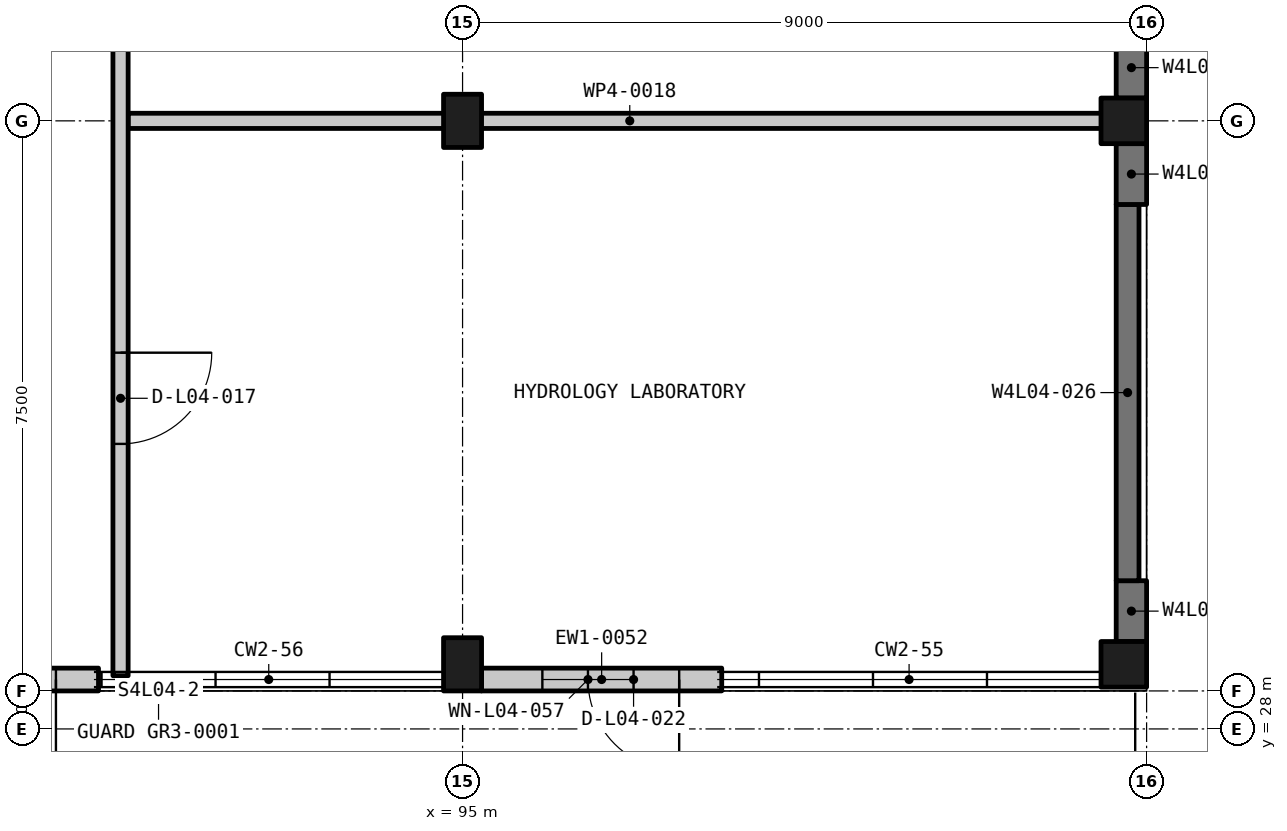
"""IFC4 building model, lengths in metres.
Left out: names, types, materials, properties, quantities, classifications, styles, units other than length and angle.
Written with IfcOpenShell. Run it as: python <this file> out.ifc"""

import sys

from ifc_helpers import new_model, si_unit, direction, frame, frame_2d, origin, origin_2d, place, context, subcontext, project, spatial, rectangle, extrude, element, fill, save


model = new_model("IFC4")
c1 = context("Model", 3, precision=1e-05, world=origin(), true_north=direction((0.0, 1.0)))
c2 = subcontext(c1, "Body", "Model", "MODEL_VIEW")
j1 = project(units=[si_unit("LENGTHUNIT", "METRE"), si_unit("PLANEANGLEUNIT", "RADIAN")], contexts=[c1])
p1 = place(None, origin())
s1 = spatial("IfcSite", under=j1, at=p1, CompositionType="ELEMENT")
p2 = place(p1, origin())
s2 = spatial("IfcBuilding", under=s1, at=p2, CompositionType="ELEMENT")
p3 = place(p2, frame((0.0, 0.0, 20.25)))
s3 = spatial("IfcBuildingStorey", under=s2, at=p3, CompositionType="ELEMENT", Elevation=20.25)
for number, where, z_axis, x_axis in (
    (1, (95.0, 28.85, -0.3), (0.0, 0.0, 1.0), (1.0, 0.0, 0.0)),
    (2, (95.0, 36.0, -0.3), (0.0, 0.0, 1.0), (1.0, 0.0, 0.0)),
):
    element("IfcColumn", number, at=place(p3, frame(where, z_axis=z_axis, x_axis=x_axis)), inside=s3, PredefinedType="COLUMN", context=c2, shape_type="SweptSolid", body=[
        extrude(rectangle(XDim=0.5, YDim=0.7, at=origin_2d()), origin(), (0.0, 0.0, 1.0), 4.5),
    ])
for number, where, z_axis, x_axis in (
    (3, (103.7, 28.85, -0.3), (0.0, 0.0, 1.0), (1.0, 0.0, 0.0)),
    (4, (103.7, 36.0, -0.3), (0.0, 0.0, 1.0), (1.0, 0.0, 0.0)),
):
    element("IfcColumn", number, at=place(p3, frame(where, z_axis=z_axis, x_axis=x_axis)), inside=s3, PredefinedType="COLUMN", context=c2, shape_type="SweptSolid", body=[
        extrude(rectangle(XDim=0.6, YDim=0.6, at=origin_2d()), origin(), (0.0, 0.0, 1.0), 4.5),
    ])
p4 = place(p3, frame((103.8, 29.15, -0.3), z_axis=(0.0, 0.0, 1.0), x_axis=(0.0, 1.0, 0.0)))
e5 = element("IfcWall", 5, at=p4, inside=s3, PredefinedType="SOLIDWALL", context=c2, shape_type="SweptSolid", body=[
    extrude(rectangle(XDim=0.8, YDim=0.4, at=frame_2d((0.4, 0.0))), origin(), (0.0, 0.0, 1.0), 4.5),
])
p5 = place(p3, frame((103.75, 29.95, -0.3), z_axis=(0.0, 0.0, 1.0), x_axis=(0.0, 1.0, 0.0)))
e6 = element("IfcWall", 6, at=p5, inside=s3, PredefinedType="SOLIDWALL", context=c2, shape_type="SweptSolid", body=[
    extrude(rectangle(XDim=4.95, YDim=0.3, at=frame_2d((2.475, 0.0))), origin(), (0.0, 0.0, 1.0), 4.5),
])
for number, where, z_axis, x_axis in (
    (7, (103.8, 34.9, -0.3), (0.0, 0.0, 1.0), (0.0, 1.0, 0.0)),
    (8, (103.8, 36.3, -0.3), (0.0, 0.0, 1.0), (0.0, 1.0, 0.0)),
):
    element("IfcWall", number, at=place(p3, frame(where, z_axis=z_axis, x_axis=x_axis)), inside=s3, PredefinedType="SOLIDWALL", context=c2, shape_type="SweptSolid", body=[
        extrude(rectangle(XDim=0.8, YDim=0.4, at=frame_2d((0.4, 0.0))), origin(), (0.0, 0.0, 1.0), 4.5),
    ])
p6 = place(p3, frame((98.41, 28.65, 0.0), z_axis=(0.0, 0.0, 1.0), x_axis=(-1.0, 0.0, 0.0)))
e9 = element("IfcWall", 9, at=p6, inside=s3, PredefinedType="SOLIDWALL", context=c2, shape_type="SweptSolid", body=[
    extrude(rectangle(XDim=3.16, YDim=0.3, at=frame_2d((1.58, 0.0))), origin(), (0.0, 0.0, 1.0), 3.4),
])
p7 = place(p6, frame((0.56, 0.0, 0.0)))
e10 = element("IfcOpeningElement", 10, at=p7, cuts=e9, PredefinedType="OPENING", context=c2, shape_type="SweptSolid", body=[
    extrude(rectangle(XDim=1.2, YDim=2.2, at=frame_2d((0.6, 1.1))), frame((0.0, 0.16, 0.0), z_axis=(0.0, -1.0, 0.0), x_axis=(1.0, 0.0, 0.0)), (0.0, 0.0, 1.0), 0.32),
])
p8 = place(p6, frame((1.16, 0.0, 2.4)))
e11 = element("IfcOpeningElement", 11, at=p8, cuts=e9, PredefinedType="OPENING", context=c2, shape_type="SweptSolid", body=[
    extrude(rectangle(XDim=1.2, YDim=0.6, at=frame_2d((0.6, 0.3))), frame((0.0, 0.16, 0.0), z_axis=(0.0, -1.0, 0.0), x_axis=(1.0, 0.0, 0.0)), (0.0, 0.0, 1.0), 0.32),
])
p9 = place(p3, frame((90.21, 28.65, 0.0), z_axis=(0.0, 0.0, 1.0), x_axis=(-1.0, 0.0, 0.0)))
e12 = element("IfcWall", 12, at=p9, inside=s3, PredefinedType="SOLIDWALL", context=c2, shape_type="SweptSolid", body=[
    extrude(rectangle(XDim=2.71, YDim=0.3, at=frame_2d((1.355, 0.0))), origin(), (0.0, 0.0, 1.0), 3.3),
])
p10 = place(p9, frame((0.56, 0.0, 0.0)))
e13 = element("IfcOpeningElement", 13, at=p10, cuts=e12, PredefinedType="OPENING", context=c2, shape_type="SweptSolid", body=[
    extrude(rectangle(XDim=1.8, YDim=2.2, at=frame_2d((0.9, 1.1))), frame((0.0, 0.16, 0.0), z_axis=(0.0, -1.0, 0.0), x_axis=(1.0, 0.0, 0.0)), (0.0, 0.0, 1.0), 0.32),
])
p11 = place(p3, frame((90.6, 36.0, 0.0), z_axis=(0.0, 0.0, 1.0), x_axis=(1.0, 0.0, 0.0)))
e14 = element("IfcWall", 14, at=p11, inside=s3, PredefinedType="PARTITIONING", context=c2, shape_type="SweptSolid", body=[
    extrude(rectangle(XDim=13.2, YDim=0.2, at=frame_2d((6.6, 0.0))), origin(), (0.0, 0.0, 1.0), 3.3),
])
p12 = place(p3, frame((90.5, 80.8, 0.0), z_axis=(0.0, 0.0, 1.0), x_axis=(0.0, -1.0, 0.0)))
e15 = element("IfcWall", 15, at=p12, inside=s3, PredefinedType="PARTITIONING", context=c2, shape_type="SweptSolid", body=[
    extrude(rectangle(XDim=52.1, YDim=0.2, at=frame_2d((26.05, 0.0))), origin(), (0.0, 0.0, 1.0), 3.3),
])
p13 = place(p12, frame((47.85, 0.0, 0.0)))
e16 = element("IfcOpeningElement", 16, at=p13, cuts=e15, PredefinedType="OPENING", context=c2, shape_type="SweptSolid", body=[
    extrude(rectangle(XDim=1.2, YDim=2.1, at=frame_2d((0.6, 1.05))), frame((0.0, 0.11, 0.0), z_axis=(0.0, -1.0, 0.0), x_axis=(1.0, 0.0, 0.0)), (0.0, 0.0, 1.0), 0.22),
])
p14 = place(p12, frame((38.949, 0.0, 0.0)))
e17 = element("IfcOpeningElement", 17, at=p14, cuts=e15, PredefinedType="OPENING", context=c2, shape_type="SweptSolid", body=[
    extrude(rectangle(XDim=1.2, YDim=2.1, at=frame_2d((0.6, 1.05))), frame((0.0, 0.11, 0.0), z_axis=(0.0, -1.0, 0.0), x_axis=(1.0, 0.0, 0.0)), (0.0, 0.0, 1.0), 0.22),
])
p15 = place(p12, frame((24.201, 0.0, 0.0)))
e18 = element("IfcOpeningElement", 18, at=p15, cuts=e15, PredefinedType="OPENING", context=c2, shape_type="SweptSolid", body=[
    extrude(rectangle(XDim=1.2, YDim=2.1, at=frame_2d((0.6, 1.05))), frame((0.0, 0.11, 0.0), z_axis=(0.0, -1.0, 0.0), x_axis=(1.0, 0.0, 0.0)), (0.0, 0.0, 1.0), 0.22),
])
p16 = place(p12, frame((14.2, 0.0, 0.0)))
e19 = element("IfcOpeningElement", 19, at=p16, cuts=e15, PredefinedType="OPENING", context=c2, shape_type="SweptSolid", body=[
    extrude(rectangle(XDim=1.2, YDim=2.1, at=frame_2d((0.6, 1.05))), frame((0.0, 0.11, 0.0), z_axis=(0.0, -1.0, 0.0), x_axis=(1.0, 0.0, 0.0)), (0.0, 0.0, 1.0), 0.22),
])
p17 = place(p12, frame((3.075, 0.0, 0.0)))
e20 = element("IfcOpeningElement", 20, at=p17, cuts=e15, PredefinedType="OPENING", context=c2, shape_type="SweptSolid", body=[
    extrude(rectangle(XDim=1.2, YDim=2.1, at=frame_2d((0.6, 1.05))), frame((0.0, 0.11, 0.0), z_axis=(0.0, -1.0, 0.0), x_axis=(1.0, 0.0, 0.0)), (0.0, 0.0, 1.0), 0.22),
])
p18 = place(p7, origin())
e21 = element("IfcDoor", 21, at=p18, inside=s3, OperationType="SINGLE_SWING_LEFT", PredefinedType="DOOR", context=c2, shape_type="SweptSolid", body=[
    extrude(rectangle(XDim=1.2, YDim=2.2, at=frame_2d((0.6, 1.1))), frame((0.0, 0.025, 0.0), z_axis=(0.0, -1.0, 0.0), x_axis=(1.0, 0.0, 0.0)), (0.0, 0.0, 1.0), 0.05),
])
fill(e10, e21)
p19 = place(p10, origin())
e22 = element("IfcDoor", 22, at=p19, inside=s3, OperationType="SINGLE_SWING_LEFT", PredefinedType="DOOR", context=c2, shape_type="SweptSolid", body=[
    extrude(rectangle(XDim=1.8, YDim=2.2, at=frame_2d((0.9, 1.1))), frame((0.0, 0.025, 0.0), z_axis=(0.0, -1.0, 0.0), x_axis=(1.0, 0.0, 0.0)), (0.0, 0.0, 1.0), 0.05),
])
fill(e13, e22)
p20 = place(p8, origin())
e23 = element("IfcWindow", 23, at=p20, inside=s3, PartitioningType="SINGLE_PANEL", PredefinedType="WINDOW", context=c2, shape_type="SweptSolid", body=[
    extrude(rectangle(XDim=1.2, YDim=0.6, at=frame_2d((0.6, 0.3))), frame((0.0, 0.03, 0.0), z_axis=(0.0, -1.0, 0.0), x_axis=(1.0, 0.0, 0.0)), (0.0, 0.0, 1.0), 0.06),
])
fill(e11, e23)
p21 = place(p13, origin())
e24 = element("IfcDoor", 24, at=p21, inside=s3, OperationType="SINGLE_SWING_LEFT", PredefinedType="DOOR", context=c2, shape_type="SweptSolid", body=[
    extrude(rectangle(XDim=1.2, YDim=2.1, at=frame_2d((0.6, 1.05))), frame((0.0, 0.025, 0.0), z_axis=(0.0, -1.0, 0.0), x_axis=(1.0, 0.0, 0.0)), (0.0, 0.0, 1.0), 0.05),
])
fill(e16, e24)
save(model, sys.argv[1])
